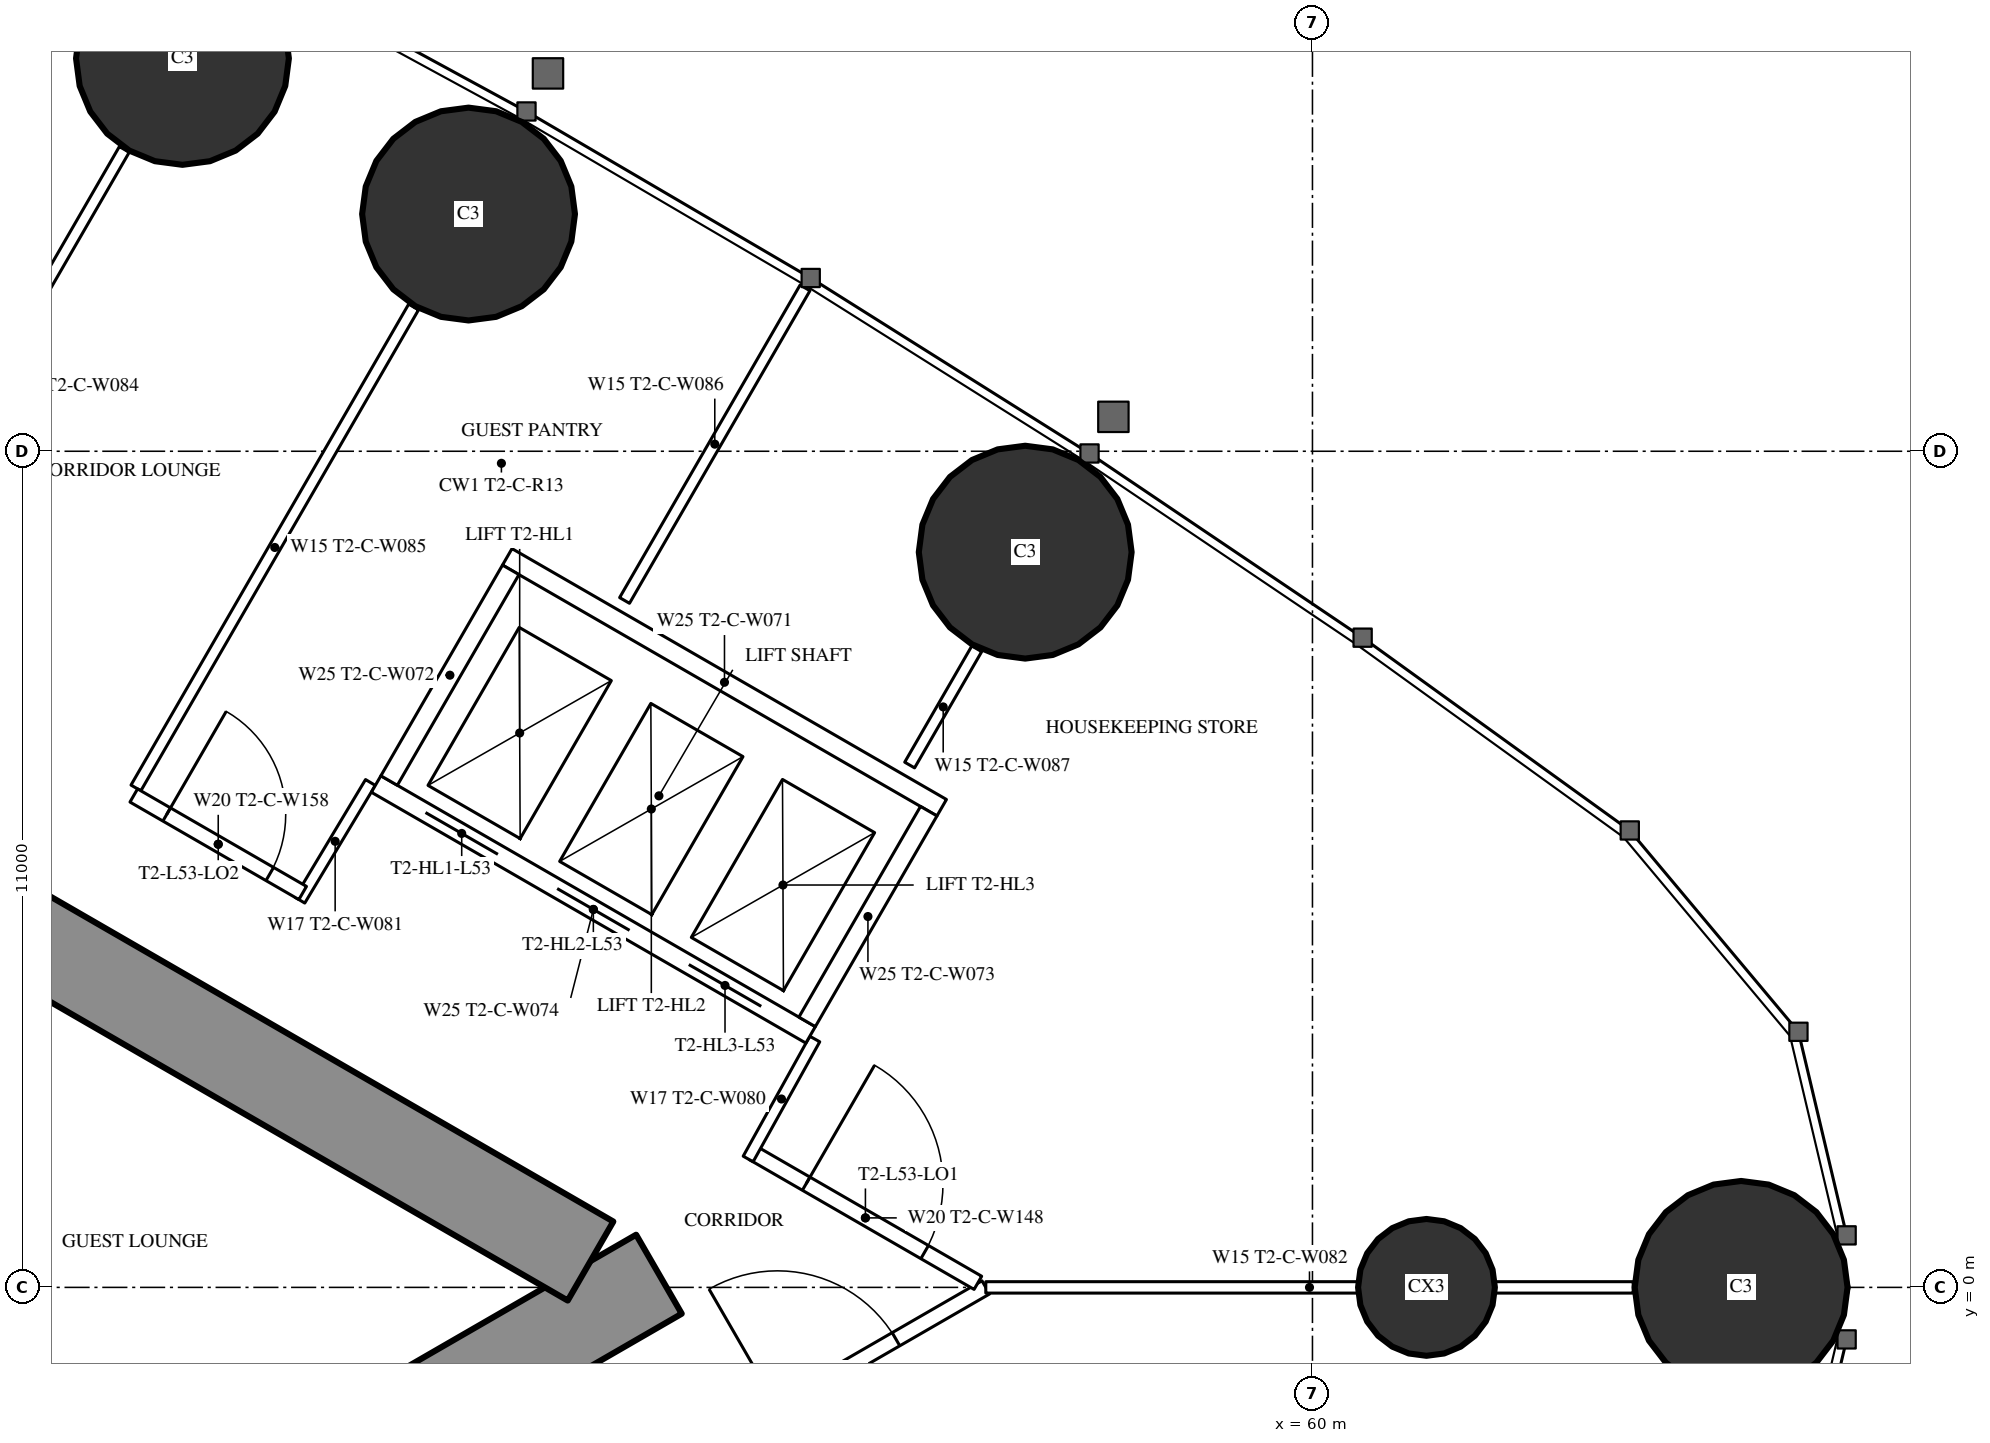
"""IFC4 building model, lengths in metres.
Left out: names, types, materials, properties, quantities, classifications, styles, units other than length and angle.
Written with IfcOpenShell. Run it as: python <this file> out.ifc"""

import sys

from ifc_helpers import new_model, si_unit, direction, frame, frame_2d, origin, origin_2d, place, context, subcontext, project, spatial, rectangle, circle, extrude, element, fill, save


model = new_model("IFC4")
c1 = context("Model", 3, precision=1e-05, world=origin(), true_north=direction((0.0, 1.0)))
c2 = subcontext(c1, "Body", "Model", "MODEL_VIEW")
j1 = project(units=[si_unit("LENGTHUNIT", "METRE"), si_unit("PLANEANGLEUNIT", "RADIAN")], contexts=[c1])
p1 = place(None, origin())
s1 = spatial("IfcSite", under=j1, at=p1, CompositionType="ELEMENT")
p2 = place(p1, origin())
s2 = spatial("IfcBuilding", under=s1, at=p2, CompositionType="ELEMENT")
p3 = place(p2, frame((0.0, 0.0, 198.3)))
s3 = spatial("IfcBuildingStorey", under=s2, at=p3, CompositionType="ELEMENT", Elevation=198.3)
for number, where, z_axis, x_axis in (
    (1, (65.64, 0.0, 0.0), (0.0, 0.0, 1.0), (1.0, 0.0, 0.0)),
    (2, (56.221, 9.672, 0.0), (0.0, 0.0, 1.0), (1.0, 0.0, 0.0)),
    (3, (48.897, 14.121, 0.0), (0.0, 0.0, 1.0), (1.0, 0.0, 0.0)),
    (4, (45.134, 16.168, 0.0), (0.0, 0.0, 1.0), (1.0, 0.0, 0.0)),
):
    element("IfcColumn", number, at=place(p3, frame(where, z_axis=z_axis, x_axis=x_axis)), inside=s3, PredefinedType="COLUMN", context=c2, shape_type="SweptSolid", body=[
        extrude(circle(Radius=1.4, at=origin_2d()), origin(), (0.0, 0.0, 1.0), 3.5),
    ])
p4 = place(p3, frame((61.5, 0.0, 0.0), z_axis=(0.0, 0.0, 1.0), x_axis=(1.0, 0.0, 0.0)))
e5 = element("IfcColumn", 5, at=p4, inside=s3, PredefinedType="COLUMN", context=c2, shape_type="SweptSolid", body=[
    extrude(circle(Radius=0.9, at=origin_2d()), origin(), (0.0, 0.0, 1.0), 3.5),
])
p5 = place(p3, frame((27.2, -13.8, 0.0), z_axis=(0.0, 0.0, 1.0), x_axis=(0.866027159892, 0.499996958321, 0.0)))
e6 = element("IfcWall", 6, at=p5, inside=s3, PredefinedType="SHEAR", context=c2, shape_type="SweptSolid", body=[
    extrude(rectangle(XDim=27.947, YDim=1.2, at=frame_2d((13.973, 0.0))), origin(), (0.0, 0.0, 1.0), 3.5),
])
p6 = place(p5, frame((4.6, 0.0, 0.0)))
e7 = element("IfcOpeningElement", 7, at=p6, cuts=e6, PredefinedType="OPENING", context=c2, shape_type="SweptSolid", body=[
    extrude(rectangle(XDim=1.0, YDim=2.2, at=frame_2d((0.5, 1.1))), frame((0.0, 0.61, 0.0), z_axis=(0.0, -1.0, 0.0), x_axis=(1.0, 0.0, 0.0)), (0.0, 0.0, 1.0), 1.22),
])
p7 = place(p5, frame((13.395, 0.0, 0.0)))
e8 = element("IfcOpeningElement", 8, at=p7, cuts=e6, PredefinedType="OPENING", context=c2, shape_type="SweptSolid", body=[
    extrude(rectangle(XDim=1.8, YDim=2.2, at=frame_2d((0.9, 1.1))), frame((0.0, 0.61, 0.0), z_axis=(0.0, -1.0, 0.0), x_axis=(1.0, 0.0, 0.0)), (0.0, 0.0, 1.0), 1.22),
])
p8 = place(p3, frame((27.2, 13.8, 0.0), z_axis=(0.0, 0.0, 1.0), x_axis=(0.866024515034, -0.500001539357, 0.0)))
e9 = element("IfcWall", 9, at=p8, inside=s3, PredefinedType="SHEAR", context=c2, shape_type="SweptSolid", body=[
    extrude(rectangle(XDim=26.907, YDim=1.2, at=frame_2d((13.454, 0.0))), origin(), (0.0, 0.0, 1.0), 3.5),
])
p9 = place(p8, frame((4.6, 0.0, 0.0)))
e10 = element("IfcOpeningElement", 10, at=p9, cuts=e9, PredefinedType="OPENING", context=c2, shape_type="SweptSolid", body=[
    extrude(rectangle(XDim=1.0, YDim=2.2, at=frame_2d((0.5, 1.1))), frame((0.0, 0.61, 0.0), z_axis=(0.0, -1.0, 0.0), x_axis=(1.0, 0.0, 0.0)), (0.0, 0.0, 1.0), 1.22),
])
p10 = place(p8, frame((13.395, 0.0, 0.0)))
e11 = element("IfcOpeningElement", 11, at=p10, cuts=e9, PredefinedType="OPENING", context=c2, shape_type="SweptSolid", body=[
    extrude(rectangle(XDim=1.8, YDim=2.2, at=frame_2d((0.9, 1.1))), frame((0.0, 0.61, 0.0), z_axis=(0.0, -1.0, 0.0), x_axis=(1.0, 0.0, 0.0)), (0.0, 0.0, 1.0), 1.22),
])
p11 = place(p3, frame((27.959, -16.017, 0.0), z_axis=(0.0, 0.0, 1.0), x_axis=(0.866024151371, 0.500002169237, 0.0)))
e12 = element("IfcWall", 12, at=p11, inside=s3, PredefinedType="PARTITIONING", context=c2, shape_type="SweptSolid", body=[
    extrude(rectangle(XDim=32.034, YDim=0.2, at=frame_2d((16.017, 0.0))), origin(), (0.0, 0.0, 1.0), 3.25),
])
p12 = place(p11, frame((0.6, 0.0, 0.0)))
e13 = element("IfcOpeningElement", 13, at=p12, cuts=e12, PredefinedType="OPENING", context=c2, shape_type="SweptSolid", body=[
    extrude(rectangle(XDim=0.95, YDim=2.2, at=frame_2d((0.475, 1.1))), frame((0.0, 0.11, 0.0), z_axis=(0.0, -1.0, 0.0), x_axis=(1.0, 0.0, 0.0)), (0.0, 0.0, 1.0), 0.22),
])
p13 = place(p11, frame((13.132, 0.0, 0.0)))
e14 = element("IfcOpeningElement", 14, at=p13, cuts=e12, PredefinedType="OPENING", context=c2, shape_type="SweptSolid", body=[
    extrude(rectangle(XDim=0.95, YDim=2.2, at=frame_2d((0.475, 1.1))), frame((0.0, 0.11, 0.0), z_axis=(0.0, -1.0, 0.0), x_axis=(1.0, 0.0, 0.0)), (0.0, 0.0, 1.0), 0.22),
])
p14 = place(p11, frame((15.391, 0.0, 0.0)))
e15 = element("IfcOpeningElement", 15, at=p14, cuts=e12, PredefinedType="OPENING", context=c2, shape_type="SweptSolid", body=[
    extrude(rectangle(XDim=0.95, YDim=2.2, at=frame_2d((0.475, 1.1))), frame((0.0, 0.11, 0.0), z_axis=(0.0, -1.0, 0.0), x_axis=(1.0, 0.0, 0.0)), (0.0, 0.0, 1.0), 0.22),
])
p15 = place(p11, frame((19.441, 0.0, 0.0)))
e16 = element("IfcOpeningElement", 16, at=p15, cuts=e12, PredefinedType="OPENING", context=c2, shape_type="SweptSolid", body=[
    extrude(rectangle(XDim=0.95, YDim=2.2, at=frame_2d((0.475, 1.1))), frame((0.0, 0.11, 0.0), z_axis=(0.0, -1.0, 0.0), x_axis=(1.0, 0.0, 0.0)), (0.0, 0.0, 1.0), 0.22),
])
p16 = place(p11, frame((26.406, 0.0, 0.0)))
e17 = element("IfcOpeningElement", 17, at=p16, cuts=e12, PredefinedType="OPENING", context=c2, shape_type="SweptSolid", body=[
    extrude(rectangle(XDim=0.95, YDim=2.2, at=frame_2d((0.475, 1.1))), frame((0.0, 0.11, 0.0), z_axis=(0.0, -1.0, 0.0), x_axis=(1.0, 0.0, 0.0)), (0.0, 0.0, 1.0), 0.22),
])
p17 = place(p11, frame((28.87, 0.0, 0.0)))
e18 = element("IfcOpeningElement", 18, at=p17, cuts=e12, PredefinedType="OPENING", context=c2, shape_type="SweptSolid", body=[
    extrude(rectangle(XDim=1.8, YDim=2.2, at=frame_2d((0.9, 1.1))), frame((0.0, 0.11, 0.0), z_axis=(0.0, -1.0, 0.0), x_axis=(1.0, 0.0, 0.0)), (0.0, 0.0, 1.0), 0.22),
])
p18 = place(p3, frame((40.769, 8.737, 0.0), z_axis=(0.0, 0.0, 1.0), x_axis=(0.500013115284, 0.866017831539, 0.0)))
e19 = element("IfcWall", 19, at=p18, inside=s3, PredefinedType="PARTITIONING", context=c2, shape_type="SweptSolid", body=[
    extrude(rectangle(XDim=7.198, YDim=0.15, at=frame_2d((3.599, 0.0))), origin(), (0.0, 0.0, 1.0), 2.3),
])
p19 = place(p3, frame((44.521, 6.571, 0.0), z_axis=(0.0, 0.0, 1.0), x_axis=(0.500020376429, 0.866013639128, 0.0)))
e20 = element("IfcWall", 20, at=p19, inside=s3, PredefinedType="PARTITIONING", context=c2, shape_type="SweptSolid", body=[
    extrude(rectangle(XDim=7.306, YDim=0.15, at=frame_2d((3.653, 0.0))), origin(), (0.0, 0.0, 1.0), 2.3),
])
p20 = place(p3, frame((55.702, 0.0, 0.0), z_axis=(0.0, 0.0, 1.0), x_axis=(1.0, 0.0, 0.0)))
e21 = element("IfcWall", 21, at=p20, inside=s3, PredefinedType="PARTITIONING", context=c2, shape_type="SweptSolid", body=[
    extrude(rectangle(XDim=8.518, YDim=0.15, at=frame_2d((4.259, 0.0))), origin(), (0.0, 0.0, 1.0), 2.3),
])
p21 = place(p3, frame((50.95, 9.037, 0.0), z_axis=(0.0, 0.0, 1.0), x_axis=(0.499988022762, 0.866032318735, 0.0)))
e22 = element("IfcWall", 22, at=p21, inside=s3, PredefinedType="PARTITIONING", context=c2, shape_type="SweptSolid", body=[
    extrude(rectangle(XDim=4.748, YDim=0.15, at=frame_2d((2.374, 0.0))), origin(), (0.0, 0.0, 1.0), 3.25),
])
p22 = place(p3, frame((54.7, 6.872, 0.0), z_axis=(0.0, 0.0, 1.0), x_axis=(0.499989690894, 0.866031355668, 0.0)))
e23 = element("IfcWall", 23, at=p22, inside=s3, PredefinedType="PARTITIONING", context=c2, shape_type="SweptSolid", body=[
    extrude(rectangle(XDim=1.766, YDim=0.15, at=frame_2d((0.883, 0.0))), origin(), (0.0, 0.0, 1.0), 3.25),
])
p23 = place(p3, frame((52.639, 1.769, 0.0), z_axis=(0.0, 0.0, 1.0), x_axis=(0.866027340901, -0.4999966448, 0.0)))
e24 = element("IfcWall", 24, at=p23, inside=s3, PredefinedType="PARTITIONING", context=c2, shape_type="SweptSolid", body=[
    extrude(rectangle(XDim=3.417, YDim=0.2, at=frame_2d((1.708, 0.0))), origin(), (0.0, 0.0, 1.0), 3.25),
])
p24 = place(p23, frame((0.809, 0.0, 0.0)))
e25 = element("IfcOpeningElement", 25, at=p24, cuts=e24, PredefinedType="OPENING", context=c2, shape_type="SweptSolid", body=[
    extrude(rectangle(XDim=1.8, YDim=2.2, at=frame_2d((0.9, 1.1))), frame((0.0, 0.11, 0.0), z_axis=(0.0, -1.0, 0.0), x_axis=(1.0, 0.0, 0.0)), (0.0, 0.0, 1.0), 0.22),
])
for number, where, z_axis, x_axis in (
    (26, (52.576, 1.689, 0.0), (0.0, 0.0, 1.0), (0.485, 0.874, 0.0)),
    (27, (47.606, 6.643, 0.0), (0.0, 0.0, 1.0), (-0.514, -0.858, 0.0)),
):
    element("IfcWall", number, at=place(p3, frame(where, z_axis=z_axis, x_axis=x_axis)), inside=s3, PredefinedType="PARTITIONING", context=c2, shape_type="SweptSolid", body=[
        extrude(rectangle(XDim=1.805, YDim=0.15, at=frame_2d((0.902, 0.0))), origin(), (0.0, 0.0, 1.0), 3.25),
    ])
p25 = place(p3, frame((44.493, 6.472, 0.0), z_axis=(0.0, 0.0, 1.0), x_axis=(0.866027140358, -0.499996992154, 0.0)))
e28 = element("IfcWall", 28, at=p25, inside=s3, PredefinedType="PARTITIONING", context=c2, shape_type="SweptSolid", body=[
    extrude(rectangle(XDim=2.566, YDim=0.2, at=frame_2d((1.283, 0.0))), origin(), (0.0, 0.0, 1.0), 3.25),
])
p26 = place(p25, frame((0.5, 0.0, 0.0)))
e29 = element("IfcOpeningElement", 29, at=p26, cuts=e28, PredefinedType="OPENING", context=c2, shape_type="SweptSolid", body=[
    extrude(rectangle(XDim=1.566, YDim=2.2, at=frame_2d((0.783, 1.1))), frame((0.0, 0.11, 0.0), z_axis=(0.0, -1.0, 0.0), x_axis=(1.0, 0.0, 0.0)), (0.0, 0.0, 1.0), 0.22),
])
p27 = place(p3, frame((47.681, 6.622, 0.0), z_axis=(0.0, 0.0, 1.0), x_axis=(0.86603344179, -0.499986077507, 0.0)))
e30 = element("IfcWall", 30, at=p27, inside=s3, PredefinedType="PARTITIONING", context=c2, shape_type="SweptSolid", body=[
    extrude(rectangle(XDim=6.6, YDim=0.25, at=frame_2d((3.3, 0.0))), origin(), (0.0, 0.0, 1.0), 3.25),
])
p28 = place(p27, frame((0.75, 0.0, 0.0)))
e31 = element("IfcOpeningElement", 31, at=p28, cuts=e30, PredefinedType="OPENING", context=c2, shape_type="SweptSolid", body=[
    extrude(rectangle(XDim=1.1, YDim=2.2, at=frame_2d((0.55, 1.1))), frame((0.0, 0.135, 0.0), z_axis=(0.0, -1.0, 0.0), x_axis=(1.0, 0.0, 0.0)), (0.0, 0.0, 1.0), 0.27),
])
p29 = place(p27, frame((2.75, 0.0, 0.0)))
e32 = element("IfcOpeningElement", 32, at=p29, cuts=e30, PredefinedType="OPENING", context=c2, shape_type="SweptSolid", body=[
    extrude(rectangle(XDim=1.1, YDim=2.2, at=frame_2d((0.55, 1.1))), frame((0.0, 0.135, 0.0), z_axis=(0.0, -1.0, 0.0), x_axis=(1.0, 0.0, 0.0)), (0.0, 0.0, 1.0), 0.27),
])
p30 = place(p27, frame((4.75, 0.0, 0.0)))
e33 = element("IfcOpeningElement", 33, at=p30, cuts=e30, PredefinedType="OPENING", context=c2, shape_type="SweptSolid", body=[
    extrude(rectangle(XDim=1.1, YDim=2.2, at=frame_2d((0.55, 1.1))), frame((0.0, 0.135, 0.0), z_axis=(0.0, -1.0, 0.0), x_axis=(1.0, 0.0, 0.0)), (0.0, 0.0, 1.0), 0.27),
])
p31 = place(p3, frame((49.406, 9.611, 0.0), z_axis=(0.0, 0.0, 1.0), x_axis=(0.86603344179, -0.499986077507, 0.0)))
e34 = element("IfcWall", 34, at=p31, inside=s3, PredefinedType="PARTITIONING", context=c2, shape_type="SweptSolid", body=[
    extrude(rectangle(XDim=6.6, YDim=0.25, at=frame_2d((3.3, 0.0))), origin(), (0.0, 0.0, 1.0), 3.25),
])
p32 = place(p3, frame((47.852, 6.668, 0.0), z_axis=(0.0, 0.0, 1.0), x_axis=(0.499929347863, 0.866066190972, 0.0)))
e35 = element("IfcWall", 35, at=p32, inside=s3, PredefinedType="PARTITIONING", context=c2, shape_type="SweptSolid", body=[
    extrude(rectangle(XDim=3.201, YDim=0.25, at=frame_2d((1.6, 0.0))), origin(), (0.0, 0.0, 1.0), 3.25),
])
p33 = place(p3, frame((53.352, 3.493, 0.0), z_axis=(0.0, 0.0, 1.0), x_axis=(0.499872130319, 0.866099216793, 0.0)))
e36 = element("IfcWall", 36, at=p33, inside=s3, PredefinedType="PARTITIONING", context=c2, shape_type="SweptSolid", body=[
    extrude(rectangle(XDim=3.2, YDim=0.25, at=frame_2d((1.6, 0.0))), origin(), (0.0, 0.0, 1.0), 3.25),
])
p34 = place(p17, origin())
e37 = element("IfcDoor", 37, at=p34, inside=s3, OperationType="DOUBLE_DOOR_SINGLE_SWING", PredefinedType="DOOR", context=c2, shape_type="SweptSolid", body=[
    extrude(rectangle(XDim=1.8, YDim=2.2, at=frame_2d((0.9, 1.1))), frame((0.0, 0.025, 0.0), z_axis=(0.0, -1.0, 0.0), x_axis=(1.0, 0.0, 0.0)), (0.0, 0.0, 1.0), 0.05),
])
fill(e18, e37)
p35 = place(p24, origin())
e38 = element("IfcDoor", 38, at=p35, inside=s3, OperationType="DOUBLE_DOOR_SINGLE_SWING", PredefinedType="DOOR", context=c2, shape_type="SweptSolid", body=[
    extrude(rectangle(XDim=1.8, YDim=2.2, at=frame_2d((0.9, 1.1))), frame((0.0, 0.025, 0.0), z_axis=(0.0, -1.0, 0.0), x_axis=(1.0, 0.0, 0.0)), (0.0, 0.0, 1.0), 0.05),
])
fill(e25, e38)
p36 = place(p26, origin())
e39 = element("IfcDoor", 39, at=p36, inside=s3, OperationType="SINGLE_SWING_LEFT", PredefinedType="DOOR", context=c2, shape_type="SweptSolid", body=[
    extrude(rectangle(XDim=1.566, YDim=2.2, at=frame_2d((0.783, 1.1))), frame((0.0, 0.025, 0.0), z_axis=(0.0, -1.0, 0.0), x_axis=(1.0, 0.0, 0.0)), (0.0, 0.0, 1.0), 0.05),
])
fill(e29, e39)
p37 = place(p28, origin())
e40 = element("IfcDoor", 40, at=p37, inside=s3, OperationType="DOUBLE_DOOR_SLIDING", PredefinedType="USERDEFINED", context=c2, shape_type="SweptSolid", body=[
    extrude(rectangle(XDim=1.1, YDim=2.2, at=frame_2d((0.55, 1.1))), frame((0.0, 0.025, 0.0), z_axis=(0.0, -1.0, 0.0), x_axis=(1.0, 0.0, 0.0)), (0.0, 0.0, 1.0), 0.05),
])
fill(e31, e40)
p38 = place(p29, origin())
e41 = element("IfcDoor", 41, at=p38, inside=s3, OperationType="DOUBLE_DOOR_SLIDING", PredefinedType="USERDEFINED", context=c2, shape_type="SweptSolid", body=[
    extrude(rectangle(XDim=1.1, YDim=2.2, at=frame_2d((0.55, 1.1))), frame((0.0, 0.025, 0.0), z_axis=(0.0, -1.0, 0.0), x_axis=(1.0, 0.0, 0.0)), (0.0, 0.0, 1.0), 0.05),
])
fill(e32, e41)
p39 = place(p30, origin())
e42 = element("IfcDoor", 42, at=p39, inside=s3, OperationType="DOUBLE_DOOR_SLIDING", PredefinedType="USERDEFINED", context=c2, shape_type="SweptSolid", body=[
    extrude(rectangle(XDim=1.1, YDim=2.2, at=frame_2d((0.55, 1.1))), frame((0.0, 0.025, 0.0), z_axis=(0.0, -1.0, 0.0), x_axis=(1.0, 0.0, 0.0)), (0.0, 0.0, 1.0), 0.05),
])
fill(e33, e42)
save(model, sys.argv[1])
